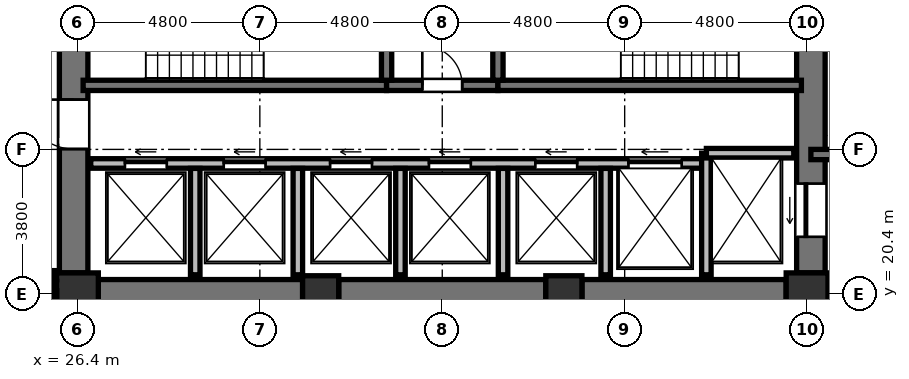
"""IFC4 building model, lengths in metres.
Left out: names, types, materials, properties, quantities, classifications, styles, units other than length and angle.
Written with IfcOpenShell. Run it as: python <this file> out.ifc"""

import sys

from ifc_helpers import new_model, si_unit, direction, frame, frame_2d, origin, origin_2d, place, context, subcontext, project, spatial, rectangle, extrude, element, fill, save


model = new_model("IFC4")
c1 = context("Model", 3, precision=1e-05, world=origin(), true_north=direction((0.0, 1.0)))
c2 = subcontext(c1, "Body", "Model", "MODEL_VIEW")
j1 = project(units=[si_unit("LENGTHUNIT", "METRE"), si_unit("PLANEANGLEUNIT", "RADIAN")], contexts=[c1])
p1 = place(None, origin())
s1 = spatial("IfcSite", under=j1, at=p1, CompositionType="ELEMENT")
p2 = place(p1, origin())
s2 = spatial("IfcBuilding", under=s1, at=p2, CompositionType="ELEMENT")
p3 = place(p2, frame((0.0, 0.0, 107.28)))
s3 = spatial("IfcBuildingStorey", under=s2, at=p3, CompositionType="ELEMENT", Elevation=107.28)
p4 = place(p3, frame((26.4, 20.4, 0.0), z_axis=(0.0, 0.0, 1.0), x_axis=(1.0, 0.0, 0.0)))
e1 = element("IfcColumn", 1, at=p4, inside=s3, PredefinedType="COLUMN", context=c2, shape_type="SweptSolid", body=[
    extrude(rectangle(XDim=1.1, YDim=1.1, at=origin_2d()), origin(), (0.0, 0.0, 1.0), 3.648),
])
for number, where, z_axis, x_axis in (
    (2, (32.8, 20.4, 0.0), (0.0, 0.0, 1.0), (1.0, 0.0, 0.0)),
    (3, (39.2, 20.4, 0.0), (0.0, 0.0, 1.0), (1.0, 0.0, 0.0)),
):
    element("IfcColumn", number, at=place(p3, frame(where, z_axis=z_axis, x_axis=x_axis)), inside=s3, PredefinedType="COLUMN", context=c2, shape_type="SweptSolid", body=[
        extrude(rectangle(XDim=0.95, YDim=0.95, at=origin_2d()), origin(), (0.0, 0.0, 1.0), 3.648),
    ])
p5 = place(p3, frame((45.6, 20.4, 0.0), z_axis=(0.0, 0.0, 1.0), x_axis=(1.0, 0.0, 0.0)))
e4 = element("IfcColumn", 4, at=p5, inside=s3, PredefinedType="COLUMN", context=c2, shape_type="SweptSolid", body=[
    extrude(rectangle(XDim=1.1, YDim=1.1, at=origin_2d()), origin(), (0.0, 0.0, 1.0), 3.648),
])
p6 = place(p3, frame((26.3, 20.95, 0.0), z_axis=(0.0, 0.0, 1.0), x_axis=(0.0, 1.0, 0.0)))
e5 = element("IfcWall", 5, at=p6, inside=s3, PredefinedType="SHEAR", context=c2, shape_type="SweptSolid", body=[
    extrude(rectangle(XDim=14.1, YDim=0.75, at=frame_2d((7.05, 0.0))), origin(), (0.0, 0.0, 1.0), 3.648),
])
p7 = place(p6, frame((6.5, 0.0, 0.0)))
e6 = element("IfcOpeningElement", 6, at=p7, cuts=e5, PredefinedType="OPENING", context=c2, shape_type="SweptSolid", body=[
    extrude(rectangle(XDim=1.2, YDim=2.15, at=frame_2d((0.6, 1.075))), frame((0.0, 0.385, 0.0), z_axis=(0.0, -1.0, 0.0), x_axis=(1.0, 0.0, 0.0)), (0.0, 0.0, 1.0), 0.77),
])
p8 = place(p6, frame((9.6, 0.0, 0.0)))
e7 = element("IfcOpeningElement", 7, at=p8, cuts=e5, PredefinedType="OPENING", context=c2, shape_type="SweptSolid", body=[
    extrude(rectangle(XDim=1.3, YDim=2.2, at=frame_2d((0.65, 1.1))), frame((0.0, 0.385, 0.0), z_axis=(0.0, -1.0, 0.0), x_axis=(1.0, 0.0, 0.0)), (0.0, 0.0, 1.0), 0.77),
])
p9 = place(p6, frame((3.26, 0.0, 0.0)))
e8 = element("IfcOpeningElement", 8, at=p9, cuts=e5, PredefinedType="OPENING", context=c2, shape_type="SweptSolid", body=[
    extrude(rectangle(XDim=1.3, YDim=2.2, at=frame_2d((0.65, 1.1))), frame((0.0, 0.385, 0.0), z_axis=(0.0, -1.0, 0.0), x_axis=(1.0, 0.0, 0.0)), (0.0, 0.0, 1.0), 0.77),
])
p10 = place(p3, frame((45.7, 20.95, 0.0), z_axis=(0.0, 0.0, 1.0), x_axis=(0.0, 1.0, 0.0)))
e9 = element("IfcWall", 9, at=p10, inside=s3, PredefinedType="SHEAR", context=c2, shape_type="SweptSolid", body=[
    extrude(rectangle(XDim=14.1, YDim=0.75, at=frame_2d((7.05, 0.0))), origin(), (0.0, 0.0, 1.0), 3.648),
])
p11 = place(p10, frame((11.75, 0.0, 0.0)))
e10 = element("IfcOpeningElement", 10, at=p11, cuts=e9, PredefinedType="OPENING", context=c2, shape_type="SweptSolid", body=[
    extrude(rectangle(XDim=1.4, YDim=2.3, at=frame_2d((0.7, 1.15))), frame((0.0, 0.385, 0.0), z_axis=(0.0, -1.0, 0.0), x_axis=(1.0, 0.0, 0.0)), (0.0, 0.0, 1.0), 0.77),
])
p12 = place(p10, frame((0.95, 0.0, 0.0)))
e11 = element("IfcOpeningElement", 11, at=p12, cuts=e9, PredefinedType="OPENING", context=c2, shape_type="SweptSolid", body=[
    extrude(rectangle(XDim=1.4, YDim=2.3, at=frame_2d((0.7, 1.15))), frame((0.0, 0.385, 0.0), z_axis=(0.0, -1.0, 0.0), x_axis=(1.0, 0.0, 0.0)), (0.0, 0.0, 1.0), 0.77),
])
p13 = place(p3, frame((26.95, 20.4, 0.0), z_axis=(0.0, 0.0, 1.0), x_axis=(1.0, 0.0, 0.0)))
e12 = element("IfcWall", 12, at=p13, inside=s3, PredefinedType="SHEAR", context=c2, shape_type="SweptSolid", body=[
    extrude(rectangle(XDim=5.375, YDim=0.75, at=frame_2d((2.688, 0.0))), origin(), (0.0, 0.0, 1.0), 3.648),
])
p14 = place(p3, frame((33.275, 20.4, 0.0), z_axis=(0.0, 0.0, 1.0), x_axis=(1.0, 0.0, 0.0)))
e13 = element("IfcWall", 13, at=p14, inside=s3, PredefinedType="SHEAR", context=c2, shape_type="SweptSolid", body=[
    extrude(rectangle(XDim=5.45, YDim=0.75, at=frame_2d((2.725, 0.0))), origin(), (0.0, 0.0, 1.0), 3.648),
])
p15 = place(p3, frame((39.675, 20.4, 0.0), z_axis=(0.0, 0.0, 1.0), x_axis=(1.0, 0.0, 0.0)))
e14 = element("IfcWall", 14, at=p15, inside=s3, PredefinedType="SHEAR", context=c2, shape_type="SweptSolid", body=[
    extrude(rectangle(XDim=5.375, YDim=0.75, at=frame_2d((2.688, 0.0))), origin(), (0.0, 0.0, 1.0), 3.648),
])
p16 = place(p3, frame((26.55, 25.885, 0.0), z_axis=(0.0, 0.0, 1.0), x_axis=(1.0, 0.0, 0.0)))
e15 = element("IfcWall", 15, at=p16, inside=s3, PredefinedType="SHEAR", context=c2, shape_type="SweptSolid", body=[
    extrude(rectangle(XDim=7.985, YDim=0.27, at=frame_2d((3.992, 0.0))), origin(), (0.0, 0.0, 1.0), 3.648),
])
p17 = place(p3, frame((34.535, 25.885, 0.0), z_axis=(0.0, 0.0, 1.0), x_axis=(1.0, 0.0, 0.0)))
e16 = element("IfcWall", 16, at=p17, inside=s3, PredefinedType="SHEAR", context=c2, shape_type="SweptSolid", body=[
    extrude(rectangle(XDim=2.93, YDim=0.27, at=frame_2d((1.465, 0.0))), origin(), (0.0, 0.0, 1.0), 3.648),
])
p18 = place(p17, frame((0.94, 0.0, 0.0)))
e17 = element("IfcOpeningElement", 17, at=p18, cuts=e16, PredefinedType="OPENING", context=c2, shape_type="SweptSolid", body=[
    extrude(rectangle(XDim=1.05, YDim=2.15, at=frame_2d((0.525, 1.075))), frame((0.0, 0.145, 0.0), z_axis=(0.0, -1.0, 0.0), x_axis=(1.0, 0.0, 0.0)), (0.0, 0.0, 1.0), 0.29),
])
p19 = place(p3, frame((37.465, 25.885, 0.0), z_axis=(0.0, 0.0, 1.0), x_axis=(1.0, 0.0, 0.0)))
e18 = element("IfcWall", 18, at=p19, inside=s3, PredefinedType="SHEAR", context=c2, shape_type="SweptSolid", body=[
    extrude(rectangle(XDim=7.985, YDim=0.27, at=frame_2d((3.992, 0.0))), origin(), (0.0, 0.0, 1.0), 3.648),
])
for number, where, z_axis, x_axis in (
    (19, (34.535, 26.02, 0.0), (0.0, 0.0, 1.0), (0.0, 1.0, 0.0)),
    (20, (37.465, 26.02, 0.0), (0.0, 0.0, 1.0), (0.0, 1.0, 0.0)),
):
    element("IfcWall", number, at=place(p3, frame(where, z_axis=z_axis, x_axis=x_axis)), inside=s3, PredefinedType="SHEAR", context=c2, shape_type="SweptSolid", body=[
        extrude(rectangle(XDim=4.08, YDim=0.27, at=frame_2d((2.04, 0.0))), origin(), (0.0, 0.0, 1.0), 3.648),
    ])
p20 = place(p3, frame((26.75, 23.83, 0.0), z_axis=(0.0, 0.0, 1.0), x_axis=(1.0, 0.0, 0.0)))
e21 = element("IfcWall", 21, at=p20, inside=s3, PredefinedType="SOLIDWALL", context=c2, shape_type="SweptSolid", body=[
    extrude(rectangle(XDim=16.2, YDim=0.25, at=frame_2d((8.1, 0.0))), origin(), (0.0, 0.0, 1.0), 3.428),
])
p21 = place(p20, frame((0.9, 0.0, 0.0)))
e22 = element("IfcOpeningElement", 22, at=p21, cuts=e21, PredefinedType="OPENING", context=c2, shape_type="SweptSolid", body=[
    extrude(rectangle(XDim=1.1, YDim=2.2, at=frame_2d((0.55, 1.1))), frame((0.0, 0.135, 0.0), z_axis=(0.0, -1.0, 0.0), x_axis=(1.0, 0.0, 0.0)), (0.0, 0.0, 1.0), 0.27),
])
p22 = place(p20, frame((3.5, 0.0, 0.0)))
e23 = element("IfcOpeningElement", 23, at=p22, cuts=e21, PredefinedType="OPENING", context=c2, shape_type="SweptSolid", body=[
    extrude(rectangle(XDim=1.1, YDim=2.2, at=frame_2d((0.55, 1.1))), frame((0.0, 0.135, 0.0), z_axis=(0.0, -1.0, 0.0), x_axis=(1.0, 0.0, 0.0)), (0.0, 0.0, 1.0), 0.27),
])
p23 = place(p20, frame((6.3, 0.0, 0.0)))
e24 = element("IfcOpeningElement", 24, at=p23, cuts=e21, PredefinedType="OPENING", context=c2, shape_type="SweptSolid", body=[
    extrude(rectangle(XDim=1.1, YDim=2.2, at=frame_2d((0.55, 1.1))), frame((0.0, 0.135, 0.0), z_axis=(0.0, -1.0, 0.0), x_axis=(1.0, 0.0, 0.0)), (0.0, 0.0, 1.0), 0.27),
])
p24 = place(p20, frame((8.9, 0.0, 0.0)))
e25 = element("IfcOpeningElement", 25, at=p24, cuts=e21, PredefinedType="OPENING", context=c2, shape_type="SweptSolid", body=[
    extrude(rectangle(XDim=1.1, YDim=2.2, at=frame_2d((0.55, 1.1))), frame((0.0, 0.135, 0.0), z_axis=(0.0, -1.0, 0.0), x_axis=(1.0, 0.0, 0.0)), (0.0, 0.0, 1.0), 0.27),
])
p25 = place(p20, frame((11.7, 0.0, 0.0)))
e26 = element("IfcOpeningElement", 26, at=p25, cuts=e21, PredefinedType="OPENING", context=c2, shape_type="SweptSolid", body=[
    extrude(rectangle(XDim=1.1, YDim=2.2, at=frame_2d((0.55, 1.1))), frame((0.0, 0.135, 0.0), z_axis=(0.0, -1.0, 0.0), x_axis=(1.0, 0.0, 0.0)), (0.0, 0.0, 1.0), 0.27),
])
p26 = place(p20, frame((14.15, 0.0, 0.0)))
e27 = element("IfcOpeningElement", 27, at=p26, cuts=e21, PredefinedType="OPENING", context=c2, shape_type="SweptSolid", body=[
    extrude(rectangle(XDim=1.4, YDim=2.3, at=frame_2d((0.7, 1.15))), frame((0.0, 0.135, 0.0), z_axis=(0.0, -1.0, 0.0), x_axis=(1.0, 0.0, 0.0)), (0.0, 0.0, 1.0), 0.27),
])
p27 = place(p3, frame((42.95, 20.9, 0.0), z_axis=(0.0, 0.0, 1.0), x_axis=(0.0, 1.0, 0.0)))
e28 = element("IfcWall", 28, at=p27, inside=s3, PredefinedType="SOLIDWALL", context=c2, shape_type="SweptSolid", body=[
    extrude(rectangle(XDim=3.2, YDim=0.25, at=frame_2d((1.6, 0.0))), origin(), (0.0, 0.0, 1.0), 3.428),
])
p28 = place(p3, frame((42.95, 24.1, 0.0), z_axis=(0.0, 0.0, 1.0), x_axis=(1.0, 0.0, 0.0)))
e29 = element("IfcWall", 29, at=p28, inside=s3, PredefinedType="SOLIDWALL", context=c2, shape_type="SweptSolid", body=[
    extrude(rectangle(XDim=2.3, YDim=0.25, at=frame_2d((1.15, 0.0))), origin(), (0.0, 0.0, 1.0), 3.428),
])
for number, where, z_axis, x_axis in (
    (30, (29.5, 20.9, 0.0), (0.0, 0.0, 1.0), (0.0, 1.0, 0.0)),
    (31, (32.2, 20.9, 0.0), (0.0, 0.0, 1.0), (0.0, 1.0, 0.0)),
    (32, (34.9, 20.9, 0.0), (0.0, 0.0, 1.0), (0.0, 1.0, 0.0)),
    (33, (37.6, 20.9, 0.0), (0.0, 0.0, 1.0), (0.0, 1.0, 0.0)),
    (34, (40.3, 20.9, 0.0), (0.0, 0.0, 1.0), (0.0, 1.0, 0.0)),
):
    element("IfcWall", number, at=place(p3, frame(where, z_axis=z_axis, x_axis=x_axis)), inside=s3, PredefinedType="SOLIDWALL", context=c2, shape_type="SweptSolid", body=[
        extrude(rectangle(XDim=2.8, YDim=0.25, at=frame_2d((1.4, 0.0))), origin(), (0.0, 0.0, 1.0), 3.428),
    ])
p29 = place(p3, frame((45.7, 24.065, 0.0), z_axis=(0.0, 0.0, 1.0), x_axis=(1.0, 0.0, 0.0)))
e35 = element("IfcWall", 35, at=p29, inside=s3, PredefinedType="SHEAR", context=c2, shape_type="SweptSolid", body=[
    extrude(rectangle(XDim=4.715, YDim=0.27, at=frame_2d((2.357, 0.0))), origin(), (0.0, 0.0, 1.0), 3.648),
])
p30 = place(p3, frame((25.83, 21.01, 0.0), z_axis=(0.0, 0.0, 1.0), x_axis=(0.0, -1.0, 0.0)))
e36 = element("IfcWall", 36, at=p30, inside=s3, PredefinedType="PARTITIONING", context=c2, shape_type="SweptSolid", body=[
    extrude(rectangle(XDim=1.22, YDim=0.18, at=frame_2d((0.61, 0.0))), origin(), (0.0, 0.0, 1.0), 3.428),
])
p31 = place(p18, origin())
e37 = element("IfcDoor", 37, at=p31, inside=s3, OperationType="SINGLE_SWING_LEFT", PredefinedType="DOOR", context=c2, shape_type="SweptSolid", body=[
    extrude(rectangle(XDim=1.05, YDim=2.15, at=frame_2d((0.525, 1.075))), frame((0.0, 0.025, 0.0), z_axis=(0.0, -1.0, 0.0), x_axis=(1.0, 0.0, 0.0)), (0.0, 0.0, 1.0), 0.05),
])
fill(e17, e37)
p32 = place(p9, origin())
e38 = element("IfcDoor", 38, at=p32, inside=s3, OperationType="SINGLE_SWING_RIGHT", PredefinedType="DOOR", context=c2, shape_type="SweptSolid", body=[
    extrude(rectangle(XDim=1.3, YDim=2.2, at=frame_2d((0.65, 1.1))), frame((0.0, 0.025, 0.0), z_axis=(0.0, -1.0, 0.0), x_axis=(1.0, 0.0, 0.0)), (0.0, 0.0, 1.0), 0.05),
])
fill(e8, e38)
p33 = place(p21, origin())
e39 = element("IfcDoor", 39, at=p33, inside=s3, OperationType="SLIDING_TO_LEFT", PredefinedType="DOOR", context=c2, shape_type="SweptSolid", body=[
    extrude(rectangle(XDim=1.1, YDim=2.2, at=frame_2d((0.55, 1.1))), frame((0.0, 0.025, 0.0), z_axis=(0.0, -1.0, 0.0), x_axis=(1.0, 0.0, 0.0)), (0.0, 0.0, 1.0), 0.05),
])
fill(e22, e39)
p34 = place(p22, origin())
e40 = element("IfcDoor", 40, at=p34, inside=s3, OperationType="SLIDING_TO_LEFT", PredefinedType="DOOR", context=c2, shape_type="SweptSolid", body=[
    extrude(rectangle(XDim=1.1, YDim=2.2, at=frame_2d((0.55, 1.1))), frame((0.0, 0.025, 0.0), z_axis=(0.0, -1.0, 0.0), x_axis=(1.0, 0.0, 0.0)), (0.0, 0.0, 1.0), 0.05),
])
fill(e23, e40)
p35 = place(p23, origin())
e41 = element("IfcDoor", 41, at=p35, inside=s3, OperationType="SLIDING_TO_LEFT", PredefinedType="DOOR", context=c2, shape_type="SweptSolid", body=[
    extrude(rectangle(XDim=1.1, YDim=2.2, at=frame_2d((0.55, 1.1))), frame((0.0, 0.025, 0.0), z_axis=(0.0, -1.0, 0.0), x_axis=(1.0, 0.0, 0.0)), (0.0, 0.0, 1.0), 0.05),
])
fill(e24, e41)
p36 = place(p24, origin())
e42 = element("IfcDoor", 42, at=p36, inside=s3, OperationType="SLIDING_TO_LEFT", PredefinedType="DOOR", context=c2, shape_type="SweptSolid", body=[
    extrude(rectangle(XDim=1.1, YDim=2.2, at=frame_2d((0.55, 1.1))), frame((0.0, 0.025, 0.0), z_axis=(0.0, -1.0, 0.0), x_axis=(1.0, 0.0, 0.0)), (0.0, 0.0, 1.0), 0.05),
])
fill(e25, e42)
p37 = place(p25, origin())
e43 = element("IfcDoor", 43, at=p37, inside=s3, OperationType="SLIDING_TO_LEFT", PredefinedType="DOOR", context=c2, shape_type="SweptSolid", body=[
    extrude(rectangle(XDim=1.1, YDim=2.2, at=frame_2d((0.55, 1.1))), frame((0.0, 0.025, 0.0), z_axis=(0.0, -1.0, 0.0), x_axis=(1.0, 0.0, 0.0)), (0.0, 0.0, 1.0), 0.05),
])
fill(e26, e43)
p38 = place(p12, origin())
e44 = element("IfcDoor", 44, at=p38, inside=s3, OperationType="SLIDING_TO_LEFT", PredefinedType="DOOR", context=c2, shape_type="SweptSolid", body=[
    extrude(rectangle(XDim=1.4, YDim=2.3, at=frame_2d((0.7, 1.15))), frame((0.0, 0.025, 0.0), z_axis=(0.0, -1.0, 0.0), x_axis=(1.0, 0.0, 0.0)), (0.0, 0.0, 1.0), 0.05),
])
fill(e11, e44)
p39 = place(p26, origin())
e45 = element("IfcDoor", 45, at=p39, inside=s3, OperationType="SLIDING_TO_LEFT", PredefinedType="DOOR", context=c2, shape_type="SweptSolid", body=[
    extrude(rectangle(XDim=1.4, YDim=2.3, at=frame_2d((0.7, 1.15))), frame((0.0, 0.025, 0.0), z_axis=(0.0, -1.0, 0.0), x_axis=(1.0, 0.0, 0.0)), (0.0, 0.0, 1.0), 0.05),
])
fill(e27, e45)
save(model, sys.argv[1])
